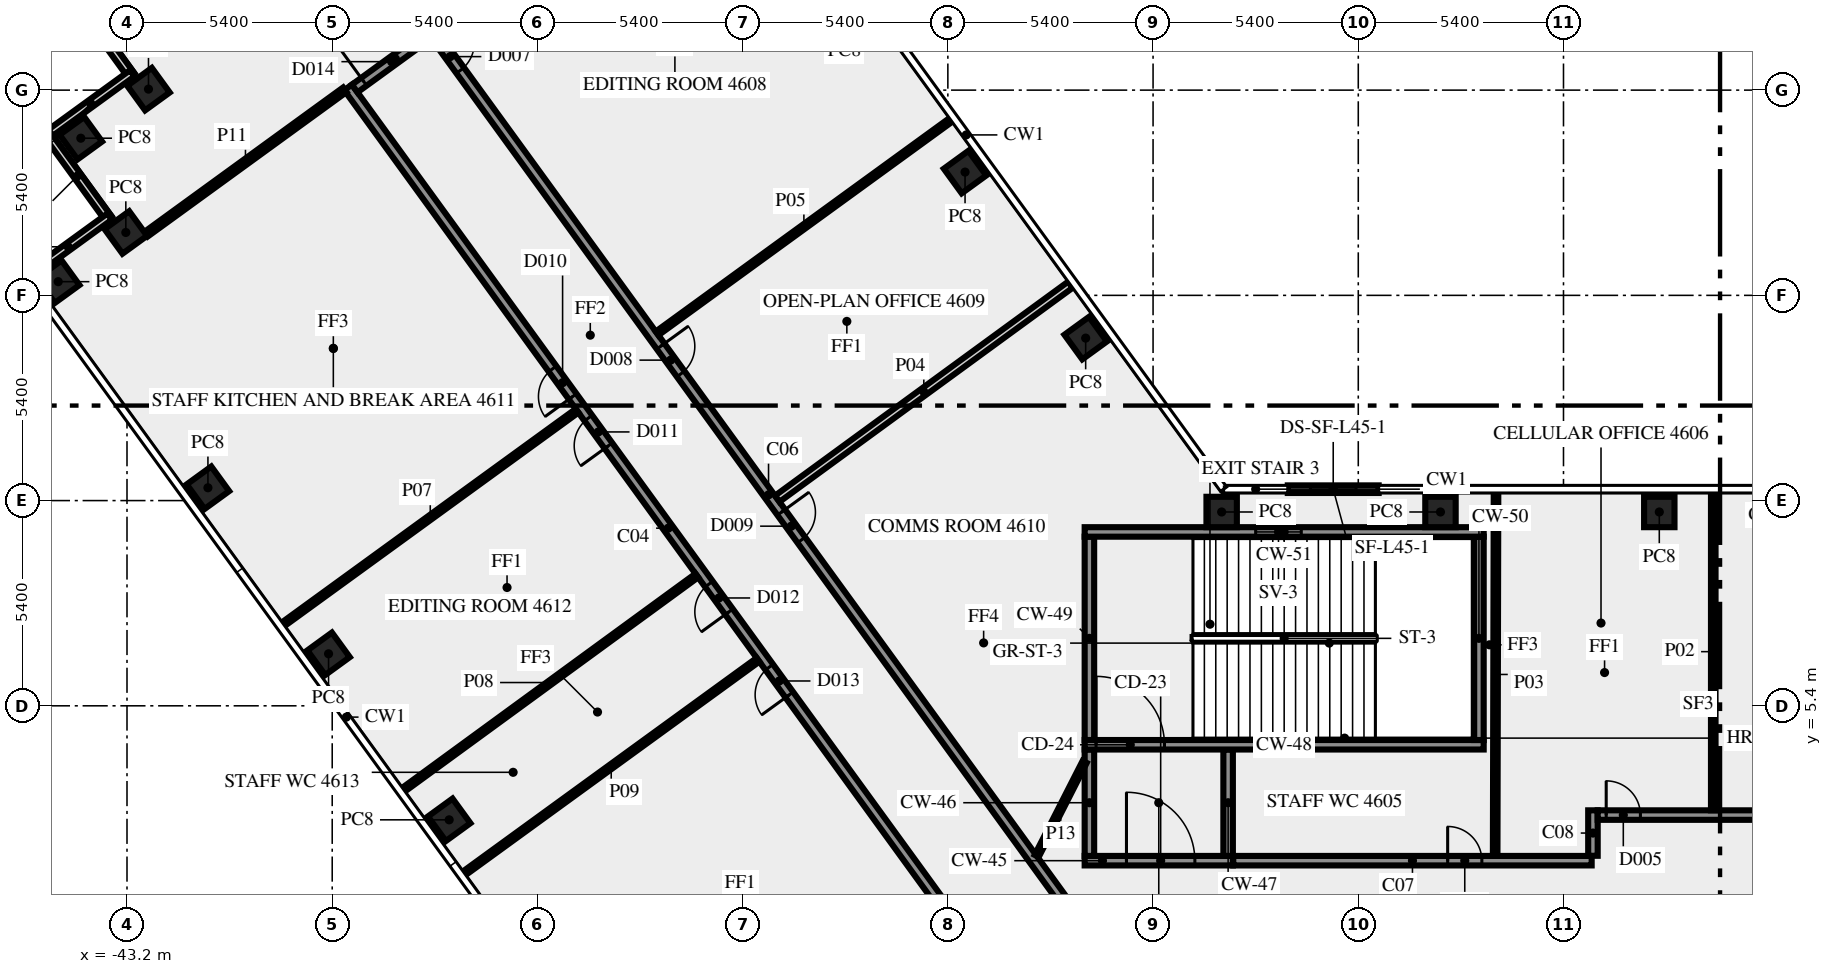
"""IFC4 building model, lengths in metres.
Left out: names, types, materials, properties, quantities, classifications, styles, units other than length and angle.
Written with IfcOpenShell. Run it as: python <this file> out.ifc"""

import sys

from ifc_helpers import new_model, si_unit, direction, frame, frame_2d, origin, origin_2d, place, context, subcontext, project, spatial, rectangle, extrude, element, fill, save


model = new_model("IFC4")
c1 = context("Model", 3, precision=1e-05, world=origin(), true_north=direction((0.0, 1.0)))
c2 = subcontext(c1, "Body", "Model", "MODEL_VIEW")
j1 = project(units=[si_unit("LENGTHUNIT", "METRE"), si_unit("PLANEANGLEUNIT", "RADIAN")], contexts=[c1])
p1 = place(None, origin())
s1 = spatial("IfcSite", under=j1, at=p1, CompositionType="ELEMENT")
p2 = place(p1, origin())
s2 = spatial("IfcBuilding", under=s1, at=p2, CompositionType="ELEMENT")
p3 = place(p2, frame((0.0, 0.0, 198.0)))
s3 = spatial("IfcBuildingStorey", under=s2, at=p3, CompositionType="ELEMENT", Elevation=198.0)
for number, where, z_axis, x_axis in (
    (1, (-17.974, 15.075, 0.0), (0.0, 0.0, 1.0), (-0.588, 0.809, 0.0)),
    (2, (-21.147, 19.444, 0.0), (0.0, 0.0, 1.0), (-0.588, 0.809, 0.0)),
    (3, (-42.635, 21.626, 0.0), (0.0, 0.0, 1.0), (-0.809, -0.588, 0.0)),
    (4, (-44.415, 20.335, 0.0), (0.0, 0.0, 1.0), (0.588, -0.809, 0.0)),
    (5, (-43.231, 17.854, 0.0), (0.0, 0.0, 1.0), (0.588, -0.809, 0.0)),
    (6, (-45.01, 16.56, 0.0), (0.0, 0.0, 1.0), (0.588, -0.809, 0.0)),
    (7, (-41.07, 11.137, 0.0), (0.0, 0.0, 1.0), (0.588, -0.809, 0.0)),
    (8, (-37.896, 6.769, 0.0), (0.0, 0.0, 1.0), (0.588, -0.809, 0.0)),
    (9, (-34.722, 2.4, 0.0), (0.0, 0.0, 1.0), (0.588, -0.809, 0.0)),
    (10, (-2.879, 10.5, 0.0), (0.0, 0.0, 1.0), (-1.0, 0.0, 0.0)),
    (11, (-8.637, 10.5, 0.0), (0.0, 0.0, 1.0), (-1.0, 0.0, 0.0)),
    (12, (-14.395, 10.5, 0.0), (0.0, 0.0, 1.0), (-1.0, 0.0, 0.0)),
):
    element("IfcColumn", number, at=place(p3, frame(where, z_axis=z_axis, x_axis=x_axis)), inside=s3, PredefinedType="COLUMN", context=c2, shape_type="SweptSolid", body=[
        extrude(rectangle(XDim=0.8, YDim=0.8, at=origin_2d()), origin(), (0.0, 0.0, 1.0), 3.65),
    ])
p4 = place(p3, frame((-10.263, 11.1, 0.0), z_axis=(0.0, 0.0, 1.0), x_axis=(-1.0, 0.0, 0.0)))
e13 = element("IfcWall", 13, at=p4, inside=s3, PredefinedType="SOLIDWALL", context=c2, shape_type="SweptSolid", body=[
    extrude(rectangle(XDim=2.392, YDim=0.2, at=frame_2d((1.196, 0.0))), origin(), (0.0, 0.0, 1.0), 3.65),
])
p5 = place(p4, frame((0.596, 0.0, 1.0)))
e14 = element("IfcOpeningElement", 14, at=p5, cuts=e13, PredefinedType="OPENING", context=c2, shape_type="SweptSolid", body=[
    extrude(rectangle(XDim=1.2, YDim=1.2, at=frame_2d((0.6, 0.6))), frame((0.0, 0.11, 0.0), z_axis=(0.0, -1.0, 0.0), x_axis=(1.0, 0.0, 0.0)), (0.0, 0.0, 1.0), 0.22),
])
for number, where, z_axis, x_axis in (
    (15, (-44.699, 24.205, 0.0), (0.0, 0.0, 1.0), (0.588, -0.809, 0.0)),
    (16, (-43.061, 22.043, 0.0), (0.0, 0.0, 1.0), (-0.809, -0.588, 0.0)),
    (17, (-45.296, 20.434, 0.0), (0.0, 0.0, 1.0), (0.588, -0.809, 0.0)),
    (18, (-43.658, 18.272, 0.0), (0.0, 0.0, 1.0), (-0.809, -0.588, 0.0)),
):
    element("IfcWall", number, at=place(p3, frame(where, z_axis=z_axis, x_axis=x_axis)), inside=s3, PredefinedType="SOLIDWALL", context=c2, shape_type="SweptSolid", body=[
        extrude(rectangle(XDim=2.7, YDim=0.2, at=frame_2d((1.35, 0.0))), origin(), (0.0, 0.0, 1.0), 3.65),
    ])
p6 = place(p3, frame((-18.0, 1.325, 0.0), z_axis=(0.0, 0.0, 1.0), x_axis=(1.0, 0.0, 0.0)))
e19 = element("IfcWall", 19, at=p6, inside=s3, PredefinedType="SHEAR", context=c2, shape_type="SweptSolid", body=[
    extrude(rectangle(XDim=3.9, YDim=0.25, at=frame_2d((1.95, 0.0))), origin(), (0.0, 0.0, 1.0), 3.65),
])
p7 = place(p6, frame((1.1, 0.0, 0.0)))
e20 = element("IfcOpeningElement", 20, at=p7, cuts=e19, PredefinedType="OPENING", context=c2, shape_type="SweptSolid", body=[
    extrude(rectangle(XDim=1.8, YDim=2.1, at=frame_2d((0.9, 1.05))), frame((0.0, 0.135, 0.0), z_axis=(0.0, -1.0, 0.0), x_axis=(1.0, 0.0, 0.0)), (0.0, 0.0, 1.0), 0.27),
])
for number, where, z_axis, x_axis in (
    (21, (-17.875, 1.45, 0.0), (0.0, 0.0, 1.0), (0.0, 1.0, 0.0)),
    (22, (-14.225, 1.45, 0.0), (0.0, 0.0, 1.0), (0.0, 1.0, 0.0)),
):
    element("IfcWall", number, at=place(p3, frame(where, z_axis=z_axis, x_axis=x_axis)), inside=s3, PredefinedType="SHEAR", context=c2, shape_type="SweptSolid", body=[
        extrude(rectangle(XDim=2.8, YDim=0.25, at=frame_2d((1.4, 0.0))), origin(), (0.0, 0.0, 1.0), 3.65),
    ])
p8 = place(p3, frame((-18.0, 4.375, 0.0), z_axis=(0.0, 0.0, 1.0), x_axis=(1.0, 0.0, 0.0)))
e23 = element("IfcWall", 23, at=p8, inside=s3, PredefinedType="SHEAR", context=c2, shape_type="SweptSolid", body=[
    extrude(rectangle(XDim=10.5, YDim=0.25, at=frame_2d((5.25, 0.0))), origin(), (0.0, 0.0, 1.0), 3.65),
])
p9 = place(p8, frame((0.3, 0.0, 0.0)))
e24 = element("IfcOpeningElement", 24, at=p9, cuts=e23, PredefinedType="OPENING", context=c2, shape_type="SweptSolid", body=[
    extrude(rectangle(XDim=1.8, YDim=2.1, at=frame_2d((0.9, 1.05))), frame((0.0, 0.135, 0.0), z_axis=(0.0, -1.0, 0.0), x_axis=(1.0, 0.0, 0.0)), (0.0, 0.0, 1.0), 0.27),
])
for number, where, z_axis, x_axis in (
    (25, (-17.875, 4.5, 0.0), (0.0, 0.0, 1.0), (0.0, 1.0, 0.0)),
    (26, (-7.625, 4.5, 0.0), (0.0, 0.0, 1.0), (0.0, 1.0, 0.0)),
):
    element("IfcWall", number, at=place(p3, frame(where, z_axis=z_axis, x_axis=x_axis)), inside=s3, PredefinedType="SHEAR", context=c2, shape_type="SweptSolid", body=[
        extrude(rectangle(XDim=5.35, YDim=0.25, at=frame_2d((2.675, 0.0))), origin(), (0.0, 0.0, 1.0), 3.65),
    ])
p10 = place(p3, frame((-18.0, 9.975, 0.0), z_axis=(0.0, 0.0, 1.0), x_axis=(1.0, 0.0, 0.0)))
e27 = element("IfcWall", 27, at=p10, inside=s3, PredefinedType="SHEAR", context=c2, shape_type="SweptSolid", body=[
    extrude(rectangle(XDim=10.5, YDim=0.25, at=frame_2d((5.25, 0.0))), origin(), (0.0, 0.0, 1.0), 3.65),
])
p11 = place(p10, frame((4.5, 0.0, 1.0)))
e28 = element("IfcOpeningElement", 28, at=p11, cuts=e27, PredefinedType="OPENING", context=c2, shape_type="SweptSolid", body=[
    extrude(rectangle(XDim=1.2, YDim=1.2, at=frame_2d((0.6, 0.6))), frame((0.0, 0.135, 0.0), z_axis=(0.0, -1.0, 0.0), x_axis=(1.0, 0.0, 0.0)), (0.0, 0.0, 1.0), 0.27),
])
p12 = place(p3, frame((-20.531, -1.523, 0.0), z_axis=(0.0, 0.0, 1.0), x_axis=(-0.587785812891, 0.809016587076, 0.0)))
e29 = element("IfcWall", 29, at=p12, inside=s3, PredefinedType="SOLIDWALL", context=c2, shape_type="SweptSolid", body=[
    extrude(rectangle(XDim=28.67, YDim=0.25, at=frame_2d((14.335, 0.0))), origin(), (0.0, 0.0, 1.0), 3.65),
])
p13 = place(p12, frame((17.015, 0.0, 0.0)))
e30 = element("IfcOpeningElement", 30, at=p13, cuts=e29, PredefinedType="OPENING", context=c2, shape_type="SweptSolid", body=[
    extrude(rectangle(XDim=0.9, YDim=2.1, at=frame_2d((0.45, 1.05))), frame((0.0, 0.135, 0.0), z_axis=(0.0, -1.0, 0.0), x_axis=(1.0, 0.0, 0.0)), (0.0, 0.0, 1.0), 0.27),
])
p14 = place(p12, frame((8.916, 0.0, 0.0)))
e31 = element("IfcOpeningElement", 31, at=p14, cuts=e29, PredefinedType="OPENING", context=c2, shape_type="SweptSolid", body=[
    extrude(rectangle(XDim=0.9, YDim=2.1, at=frame_2d((0.45, 1.05))), frame((0.0, 0.135, 0.0), z_axis=(0.0, -1.0, 0.0), x_axis=(1.0, 0.0, 0.0)), (0.0, 0.0, 1.0), 0.27),
])
p15 = place(p12, frame((18.616, 0.0, 0.0)))
e32 = element("IfcOpeningElement", 32, at=p15, cuts=e29, PredefinedType="OPENING", context=c2, shape_type="SweptSolid", body=[
    extrude(rectangle(XDim=0.9, YDim=2.1, at=frame_2d((0.45, 1.05))), frame((0.0, 0.135, 0.0), z_axis=(0.0, -1.0, 0.0), x_axis=(1.0, 0.0, 0.0)), (0.0, 0.0, 1.0), 0.27),
])
p16 = place(p12, frame((11.615, 0.0, 0.0)))
e33 = element("IfcOpeningElement", 33, at=p16, cuts=e29, PredefinedType="OPENING", context=c2, shape_type="SweptSolid", body=[
    extrude(rectangle(XDim=0.9, YDim=2.1, at=frame_2d((0.45, 1.05))), frame((0.0, 0.135, 0.0), z_axis=(0.0, -1.0, 0.0), x_axis=(1.0, 0.0, 0.0)), (0.0, 0.0, 1.0), 0.27),
])
p17 = place(p3, frame((-37.208, 21.644, 0.0), z_axis=(0.0, 0.0, 1.0), x_axis=(0.809038743598, 0.587755315891, 0.0)))
e34 = element("IfcWall", 34, at=p17, inside=s3, PredefinedType="SOLIDWALL", context=c2, shape_type="SweptSolid", body=[
    extrude(rectangle(XDim=2.65, YDim=0.25, at=frame_2d((1.325, 0.0))), origin(), (0.0, 0.0, 1.0), 3.65),
])
p18 = place(p17, frame((0.3, 0.0, 0.0)))
e35 = element("IfcOpeningElement", 35, at=p18, cuts=e34, PredefinedType="OPENING", context=c2, shape_type="SweptSolid", body=[
    extrude(rectangle(XDim=1.8, YDim=2.1, at=frame_2d((0.9, 1.05))), frame((0.0, 0.135, 0.0), z_axis=(0.0, -1.0, 0.0), x_axis=(1.0, 0.0, 0.0)), (0.0, 0.0, 1.0), 0.27),
])
p19 = place(p3, frame((-35.092, 23.027, 0.0), z_axis=(0.0, 0.0, 1.0), x_axis=(0.587784076945, -0.809017848313, 0.0)))
e36 = element("IfcWall", 36, at=p19, inside=s3, PredefinedType="SOLIDWALL", context=c2, shape_type="SweptSolid", body=[
    extrude(rectangle(XDim=29.853, YDim=0.25, at=frame_2d((14.927, 0.0))), origin(), (0.0, 0.0, 1.0), 3.65),
])
p20 = place(p19, frame((10.095, 0.0, 0.0)))
e37 = element("IfcOpeningElement", 37, at=p20, cuts=e36, PredefinedType="OPENING", context=c2, shape_type="SweptSolid", body=[
    extrude(rectangle(XDim=0.9, YDim=2.1, at=frame_2d((0.45, 1.05))), frame((0.0, 0.135, 0.0), z_axis=(0.0, -1.0, 0.0), x_axis=(1.0, 0.0, 0.0)), (0.0, 0.0, 1.0), 0.27),
])
p21 = place(p19, frame((15.495, 0.0, 0.0)))
e38 = element("IfcOpeningElement", 38, at=p21, cuts=e36, PredefinedType="OPENING", context=c2, shape_type="SweptSolid", body=[
    extrude(rectangle(XDim=0.9, YDim=2.1, at=frame_2d((0.45, 1.05))), frame((0.0, 0.135, 0.0), z_axis=(0.0, -1.0, 0.0), x_axis=(1.0, 0.0, 0.0)), (0.0, 0.0, 1.0), 0.27),
])
p22 = place(p19, frame((0.224, 0.0, 0.0)))
e39 = element("IfcOpeningElement", 39, at=p22, cuts=e36, PredefinedType="OPENING", context=c2, shape_type="SweptSolid", body=[
    extrude(rectangle(XDim=0.9, YDim=2.1, at=frame_2d((0.45, 1.05))), frame((0.0, 0.135, 0.0), z_axis=(0.0, -1.0, 0.0), x_axis=(1.0, 0.0, 0.0)), (0.0, 0.0, 1.0), 0.27),
])
p23 = place(p3, frame((-14.09, 1.325, 0.0), z_axis=(0.0, 0.0, 1.0), x_axis=(1.0, 0.0, 0.0)))
e40 = element("IfcWall", 40, at=p23, inside=s3, PredefinedType="SOLIDWALL", context=c2, shape_type="SweptSolid", body=[
    extrude(rectangle(XDim=9.431, YDim=0.25, at=frame_2d((4.716, 0.0))), origin(), (0.0, 0.0, 1.0), 3.65),
])
p24 = place(p23, frame((5.642, 0.0, 0.0)))
e41 = element("IfcOpeningElement", 41, at=p24, cuts=e40, PredefinedType="OPENING", context=c2, shape_type="SweptSolid", body=[
    extrude(rectangle(XDim=0.9, YDim=2.1, at=frame_2d((0.45, 1.05))), frame((0.0, 0.135, 0.0), z_axis=(0.0, -1.0, 0.0), x_axis=(1.0, 0.0, 0.0)), (0.0, 0.0, 1.0), 0.27),
])
p25 = place(p3, frame((-4.625, 1.454, 0.0), z_axis=(0.0, 0.0, 1.0), x_axis=(0.0, 1.0, 0.0)))
e42 = element("IfcWall", 42, at=p25, inside=s3, PredefinedType="SOLIDWALL", context=c2, shape_type="SweptSolid", body=[
    extrude(rectangle(XDim=1.196, YDim=0.25, at=frame_2d((0.598, 0.0))), origin(), (0.0, 0.0, 1.0), 3.65),
])
p26 = place(p3, frame((-4.5, 2.525, 0.0), z_axis=(0.0, 0.0, 1.0), x_axis=(1.0, 0.0, 0.0)))
e43 = element("IfcWall", 43, at=p26, inside=s3, PredefinedType="SOLIDWALL", context=c2, shape_type="SweptSolid", body=[
    extrude(rectangle(XDim=11.25, YDim=0.25, at=frame_2d((5.625, 0.0))), origin(), (0.0, 0.0, 1.0), 3.65),
])
p27 = place(p26, frame((0.224, 0.0, 0.0)))
e44 = element("IfcOpeningElement", 44, at=p27, cuts=e43, PredefinedType="OPENING", context=c2, shape_type="SweptSolid", body=[
    extrude(rectangle(XDim=0.9, YDim=2.1, at=frame_2d((0.45, 1.05))), frame((0.0, 0.135, 0.0), z_axis=(0.0, -1.0, 0.0), x_axis=(1.0, 0.0, 0.0)), (0.0, 0.0, 1.0), 0.27),
])
p28 = place(p26, frame((9.576, 0.0, 0.0)))
e45 = element("IfcOpeningElement", 45, at=p28, cuts=e43, PredefinedType="OPENING", context=c2, shape_type="SweptSolid", body=[
    extrude(rectangle(XDim=1.2, YDim=2.1, at=frame_2d((0.6, 1.05))), frame((0.0, 0.135, 0.0), z_axis=(0.0, -1.0, 0.0), x_axis=(1.0, 0.0, 0.0)), (0.0, 0.0, 1.0), 0.27),
])
p29 = place(p3, frame((-1.459, 2.65, 0.0), z_axis=(0.0, 0.0, 1.0), x_axis=(0.0, 1.0, 0.0)))
e46 = element("IfcWall", 46, at=p29, inside=s3, PredefinedType="PARTITIONING", context=c2, shape_type="SweptSolid", body=[
    extrude(rectangle(XDim=8.35, YDim=0.12, at=frame_2d((4.175, 0.0))), origin(), (0.0, 0.0, 1.0), 2.85),
])
p30 = place(p3, frame((-7.175, 11.0, 0.0), z_axis=(0.0, 0.0, 1.0), x_axis=(-0.002377476217, -0.999997173799, 0.0)))
e47 = element("IfcWall", 47, at=p30, inside=s3, PredefinedType="PARTITIONING", context=c2, shape_type="SweptSolid", body=[
    extrude(rectangle(XDim=9.55, YDim=0.12, at=frame_2d((4.775, 0.0))), origin(), (0.0, 0.0, 1.0), 2.85),
])
p31 = place(p3, frame((-26.089, 10.848, 0.0), z_axis=(0.0, 0.0, 1.0), x_axis=(0.807661302092, 0.589646691759, 0.0)))
e48 = element("IfcWall", 48, at=p31, inside=s3, PredefinedType="SOLIDWALL", context=c2, shape_type="SweptSolid", body=[
    extrude(rectangle(XDim=9.55, YDim=0.2, at=frame_2d((4.775, 0.0))), origin(), (0.0, 0.0, 1.0), 2.85),
])
p32 = place(p3, frame((-21.525, 20.813, 0.0), z_axis=(0.0, 0.0, 1.0), x_axis=(-0.808994684961, -0.587815957341, 0.0)))
e49 = element("IfcWall", 49, at=p32, inside=s3, PredefinedType="PARTITIONING", context=c2, shape_type="SweptSolid", body=[
    extrude(rectangle(XDim=9.55, YDim=0.12, at=frame_2d((4.775, 0.0))), origin(), (0.0, 0.0, 1.0), 2.85),
])
p33 = place(p3, frame((-31.356, 13.164, 0.0), z_axis=(0.0, 0.0, 1.0), x_axis=(-0.809102944047, -0.587666934526, 0.0)))
e50 = element("IfcWall", 50, at=p33, inside=s3, PredefinedType="PARTITIONING", context=c2, shape_type="SweptSolid", body=[
    extrude(rectangle(XDim=9.55, YDim=0.12, at=frame_2d((4.775, 0.0))), origin(), (0.0, 0.0, 1.0), 2.85),
])
p34 = place(p3, frame((-35.919, 3.197, 0.0), z_axis=(0.0, 0.0, 1.0), x_axis=(0.807645841498, 0.589667868135, 0.0)))
e51 = element("IfcWall", 51, at=p34, inside=s3, PredefinedType="PARTITIONING", context=c2, shape_type="SweptSolid", body=[
    extrude(rectangle(XDim=9.551, YDim=0.12, at=frame_2d((4.775, 0.0))), origin(), (0.0, 0.0, 1.0), 2.85),
])
p35 = place(p3, frame((-26.595, 6.611, 0.0), z_axis=(0.0, 0.0, 1.0), x_axis=(-0.80900684162, -0.587799226107, 0.0)))
e52 = element("IfcWall", 52, at=p35, inside=s3, PredefinedType="PARTITIONING", context=c2, shape_type="SweptSolid", body=[
    extrude(rectangle(XDim=9.55, YDim=0.12, at=frame_2d((4.775, 0.0))), origin(), (0.0, 0.0, 1.0), 2.85),
])
p36 = place(p3, frame((-42.698, 17.81, 0.0), z_axis=(0.0, 0.0, 1.0), x_axis=(0.80901688725, 0.587785399737, 0.0)))
e53 = element("IfcWall", 53, at=p36, inside=s3, PredefinedType="PARTITIONING", context=c2, shape_type="SweptSolid", body=[
    extrude(rectangle(XDim=6.465, YDim=0.15, at=frame_2d((3.232, 0.0))), origin(), (0.0, 0.0, 1.0), 3.65),
])
p37 = place(p3, frame((-19.261, 1.45, 0.0), z_axis=(0.0, 0.0, 1.0), x_axis=(0.453950796792, 0.891026752736, 0.0)))
e54 = element("IfcWall", 54, at=p37, inside=s3, PredefinedType="PARTITIONING", context=c2, shape_type="SweptSolid", body=[
    extrude(rectangle(XDim=2.778, YDim=0.12, at=frame_2d((1.389, 0.0))), origin(), (0.0, 0.0, 1.0), 3.65),
])
p38 = place(p5, origin())
e55 = element("IfcWindow", 55, at=p38, inside=s3, PartitioningType="SINGLE_PANEL", PredefinedType="WINDOW", context=c2, shape_type="SweptSolid", body=[
    extrude(rectangle(XDim=1.2, YDim=1.2, at=frame_2d((0.6, 0.6))), frame((0.0, 0.03, 0.0), z_axis=(0.0, -1.0, 0.0), x_axis=(1.0, 0.0, 0.0)), (0.0, 0.0, 1.0), 0.06),
])
fill(e14, e55)
p39 = place(p7, origin())
e56 = element("IfcDoor", 56, at=p39, inside=s3, OperationType="DOUBLE_DOOR_SINGLE_SWING", PredefinedType="DOOR", context=c2, shape_type="SweptSolid", body=[
    extrude(rectangle(XDim=1.8, YDim=2.1, at=frame_2d((0.9, 1.05))), frame((0.0, 0.025, 0.0), z_axis=(0.0, -1.0, 0.0), x_axis=(1.0, 0.0, 0.0)), (0.0, 0.0, 1.0), 0.05),
])
fill(e20, e56)
p40 = place(p9, origin())
e57 = element("IfcDoor", 57, at=p40, inside=s3, OperationType="DOUBLE_DOOR_SINGLE_SWING", PredefinedType="DOOR", context=c2, shape_type="SweptSolid", body=[
    extrude(rectangle(XDim=1.8, YDim=2.1, at=frame_2d((0.9, 1.05))), frame((0.0, 0.025, 0.0), z_axis=(0.0, -1.0, 0.0), x_axis=(1.0, 0.0, 0.0)), (0.0, 0.0, 1.0), 0.05),
])
fill(e24, e57)
p41 = place(p11, origin())
e58 = element("IfcWindow", 58, at=p41, inside=s3, PartitioningType="SINGLE_PANEL", PredefinedType="WINDOW", context=c2, shape_type="SweptSolid", body=[
    extrude(rectangle(XDim=1.2, YDim=1.2, at=frame_2d((0.6, 0.6))), frame((0.0, 0.03, 0.0), z_axis=(0.0, -1.0, 0.0), x_axis=(1.0, 0.0, 0.0)), (0.0, 0.0, 1.0), 0.06),
])
fill(e28, e58)
p42 = place(p27, origin())
e59 = element("IfcDoor", 59, at=p42, inside=s3, OperationType="SINGLE_SWING_LEFT", PredefinedType="DOOR", context=c2, shape_type="SweptSolid", body=[
    extrude(rectangle(XDim=0.9, YDim=2.1, at=frame_2d((0.45, 1.05))), frame((0.0, 0.025, 0.0), z_axis=(0.0, -1.0, 0.0), x_axis=(1.0, 0.0, 0.0)), (0.0, 0.0, 1.0), 0.05),
])
fill(e44, e59)
p43 = place(p20, origin())
e60 = element("IfcDoor", 60, at=p43, inside=s3, OperationType="SINGLE_SWING_LEFT", PredefinedType="DOOR", context=c2, shape_type="SweptSolid", body=[
    extrude(rectangle(XDim=0.9, YDim=2.1, at=frame_2d((0.45, 1.05))), frame((0.0, 0.025, 0.0), z_axis=(0.0, -1.0, 0.0), x_axis=(1.0, 0.0, 0.0)), (0.0, 0.0, 1.0), 0.05),
])
fill(e37, e60)
p44 = place(p21, origin())
e61 = element("IfcDoor", 61, at=p44, inside=s3, OperationType="SINGLE_SWING_LEFT", PredefinedType="DOOR", context=c2, shape_type="SweptSolid", body=[
    extrude(rectangle(XDim=0.9, YDim=2.1, at=frame_2d((0.45, 1.05))), frame((0.0, 0.025, 0.0), z_axis=(0.0, -1.0, 0.0), x_axis=(1.0, 0.0, 0.0)), (0.0, 0.0, 1.0), 0.05),
])
fill(e38, e61)
p45 = place(p22, origin())
e62 = element("IfcDoor", 62, at=p45, inside=s3, OperationType="SINGLE_SWING_LEFT", PredefinedType="DOOR", context=c2, shape_type="SweptSolid", body=[
    extrude(rectangle(XDim=0.9, YDim=2.1, at=frame_2d((0.45, 1.05))), frame((0.0, 0.025, 0.0), z_axis=(0.0, -1.0, 0.0), x_axis=(1.0, 0.0, 0.0)), (0.0, 0.0, 1.0), 0.05),
])
fill(e39, e62)
p46 = place(p13, origin())
e63 = element("IfcDoor", 63, at=p46, inside=s3, OperationType="SINGLE_SWING_RIGHT", PredefinedType="DOOR", context=c2, shape_type="SweptSolid", body=[
    extrude(rectangle(XDim=0.9, YDim=2.1, at=frame_2d((0.45, 1.05))), frame((0.0, 0.025, 0.0), z_axis=(0.0, -1.0, 0.0), x_axis=(1.0, 0.0, 0.0)), (0.0, 0.0, 1.0), 0.05),
])
fill(e30, e63)
p47 = place(p14, origin())
e64 = element("IfcDoor", 64, at=p47, inside=s3, OperationType="SINGLE_SWING_RIGHT", PredefinedType="DOOR", context=c2, shape_type="SweptSolid", body=[
    extrude(rectangle(XDim=0.9, YDim=2.1, at=frame_2d((0.45, 1.05))), frame((0.0, 0.025, 0.0), z_axis=(0.0, -1.0, 0.0), x_axis=(1.0, 0.0, 0.0)), (0.0, 0.0, 1.0), 0.05),
])
fill(e31, e64)
p48 = place(p18, origin())
e65 = element("IfcDoor", 65, at=p48, inside=s3, OperationType="DOUBLE_DOOR_SINGLE_SWING", PredefinedType="DOOR", context=c2, shape_type="SweptSolid", body=[
    extrude(rectangle(XDim=1.8, YDim=2.1, at=frame_2d((0.9, 1.05))), frame((0.0, 0.025, 0.0), z_axis=(0.0, -1.0, 0.0), x_axis=(1.0, 0.0, 0.0)), (0.0, 0.0, 1.0), 0.05),
])
fill(e35, e65)
p49 = place(p15, origin())
e66 = element("IfcDoor", 66, at=p49, inside=s3, OperationType="SINGLE_SWING_LEFT", PredefinedType="DOOR", context=c2, shape_type="SweptSolid", body=[
    extrude(rectangle(XDim=0.9, YDim=2.1, at=frame_2d((0.45, 1.05))), frame((0.0, 0.025, 0.0), z_axis=(0.0, -1.0, 0.0), x_axis=(1.0, 0.0, 0.0)), (0.0, 0.0, 1.0), 0.05),
])
fill(e32, e66)
p50 = place(p24, origin())
e67 = element("IfcDoor", 67, at=p50, inside=s3, OperationType="SINGLE_SWING_RIGHT", PredefinedType="DOOR", context=c2, shape_type="SweptSolid", body=[
    extrude(rectangle(XDim=0.9, YDim=2.1, at=frame_2d((0.45, 1.05))), frame((0.0, 0.025, 0.0), z_axis=(0.0, -1.0, 0.0), x_axis=(1.0, 0.0, 0.0)), (0.0, 0.0, 1.0), 0.05),
])
fill(e41, e67)
p51 = place(p16, origin())
e68 = element("IfcDoor", 68, at=p51, inside=s3, OperationType="SINGLE_SWING_RIGHT", PredefinedType="DOOR", context=c2, shape_type="SweptSolid", body=[
    extrude(rectangle(XDim=0.9, YDim=2.1, at=frame_2d((0.45, 1.05))), frame((0.0, 0.025, 0.0), z_axis=(0.0, -1.0, 0.0), x_axis=(1.0, 0.0, 0.0)), (0.0, 0.0, 1.0), 0.05),
])
fill(e33, e68)
save(model, sys.argv[1])
